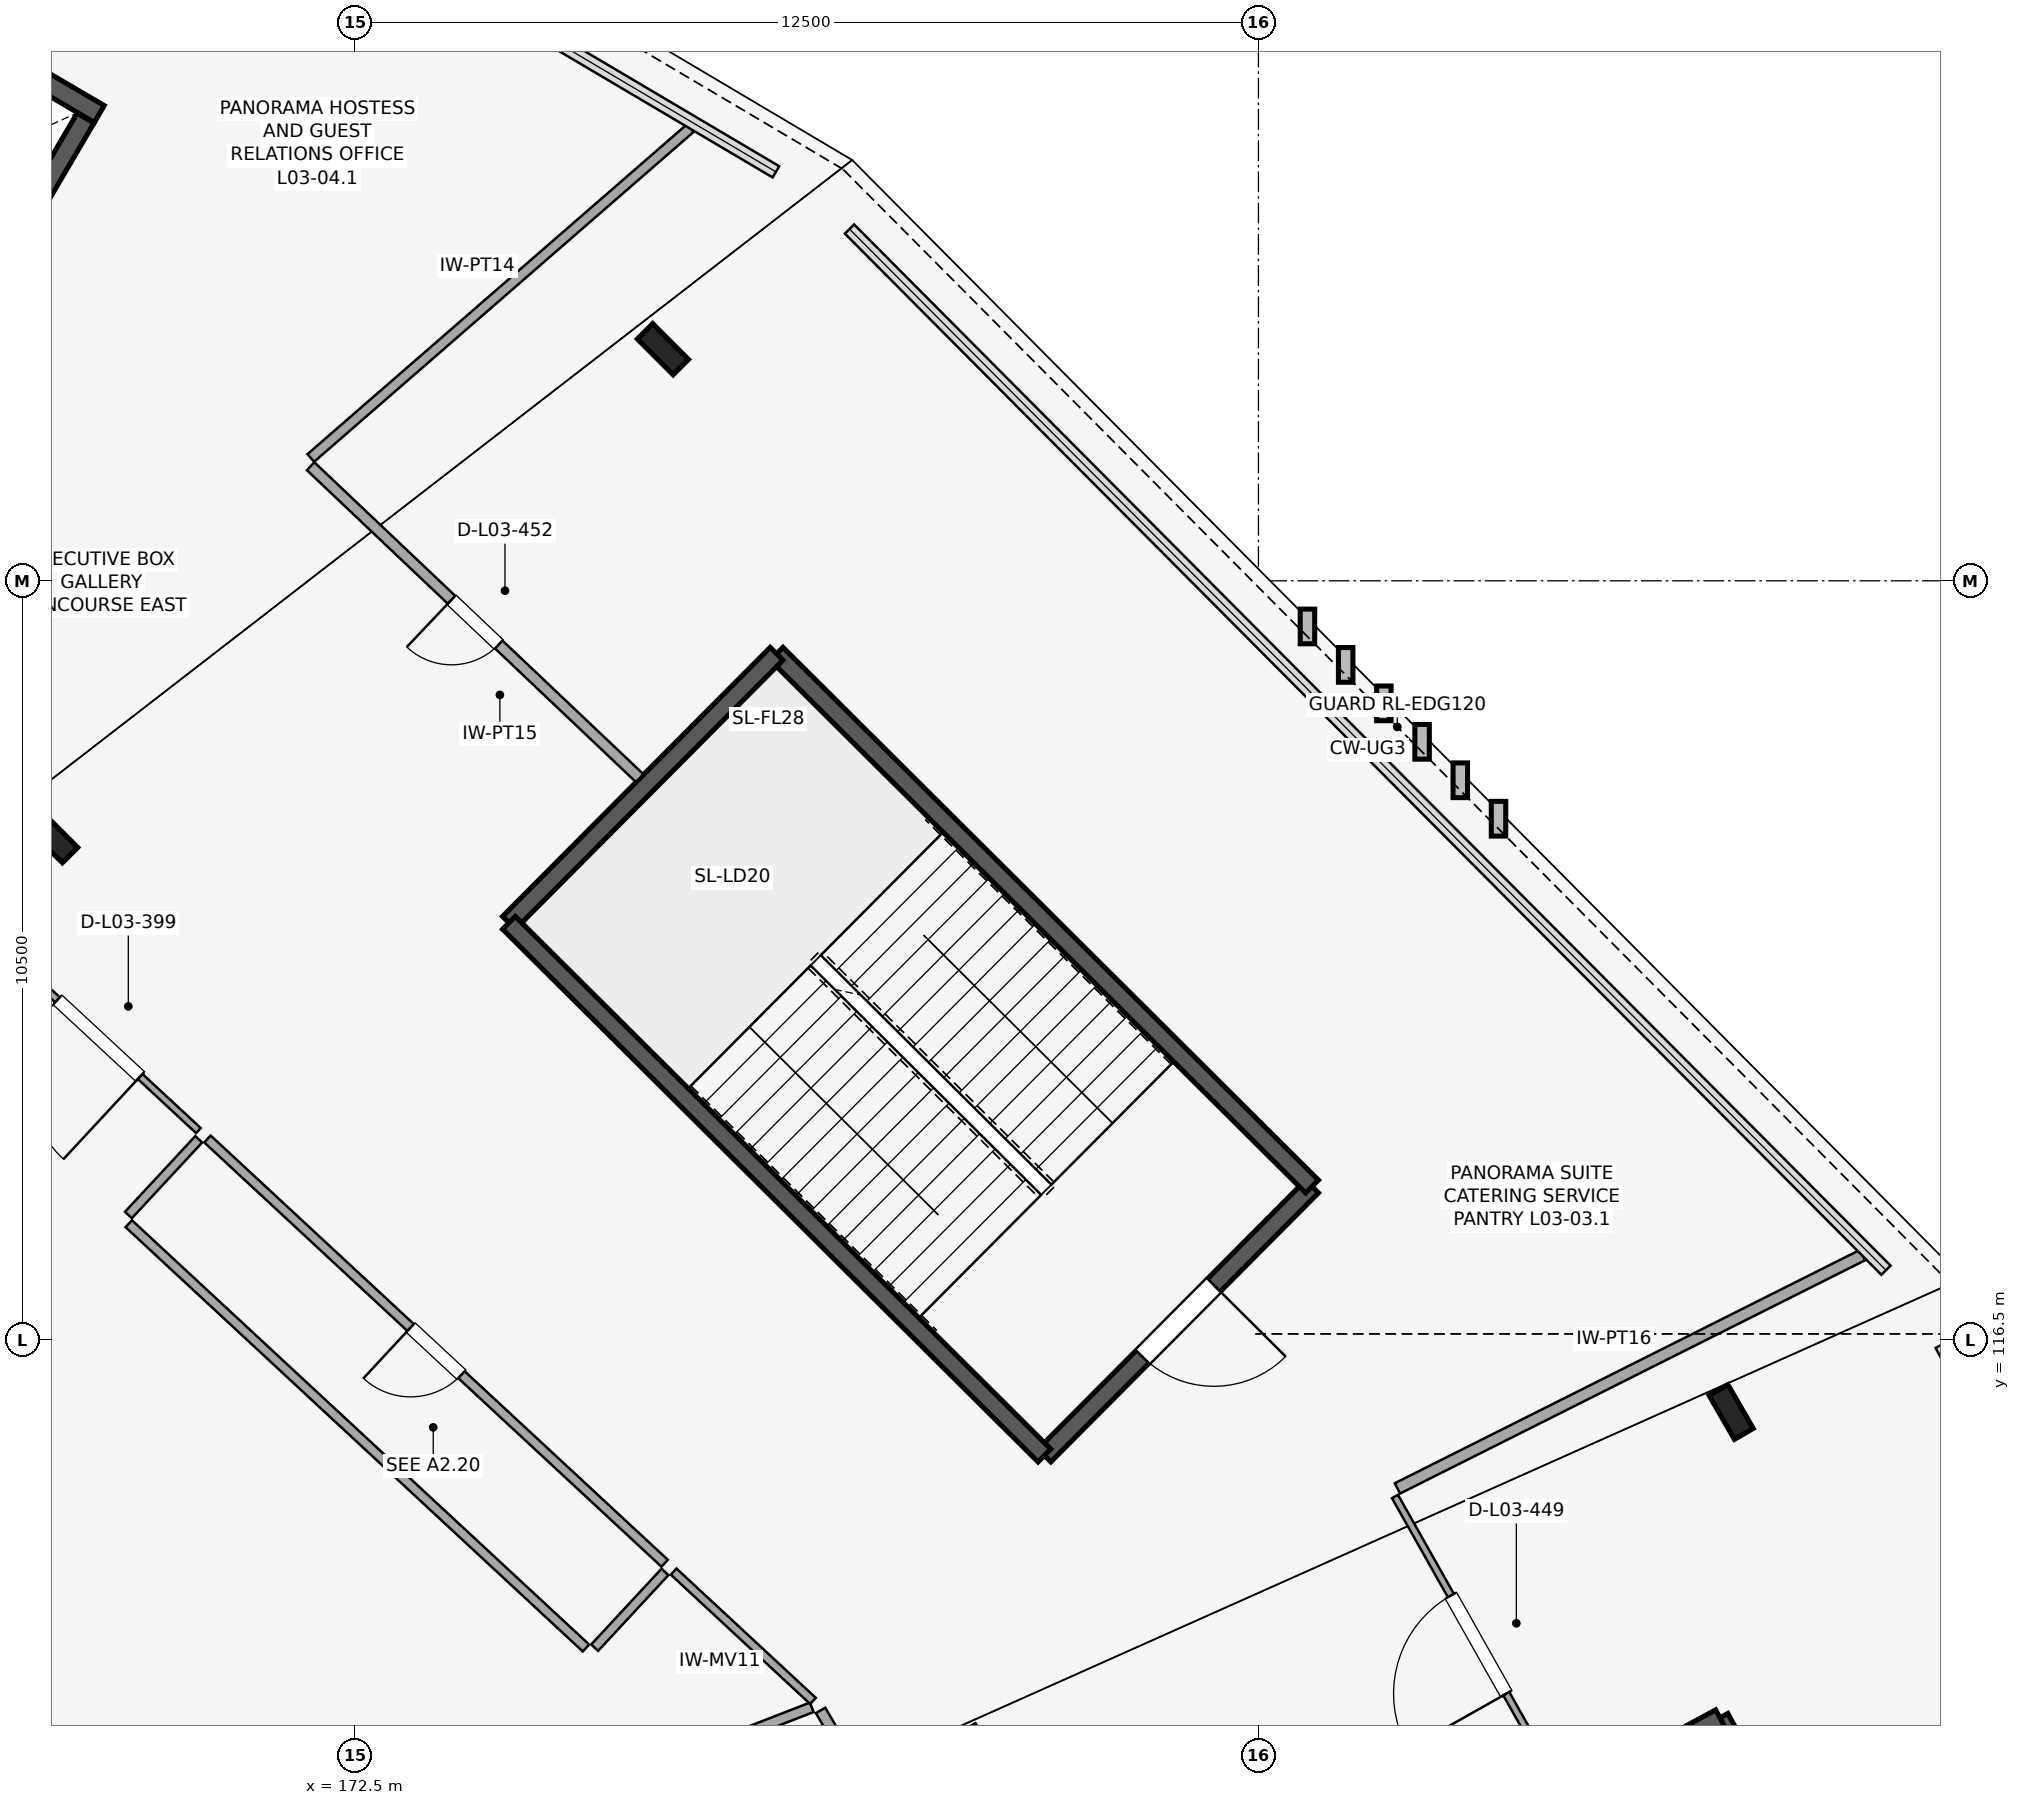
"""IFC4 building model, lengths in metres.
Left out: names, types, materials, properties, quantities, classifications, styles, units other than length and angle.
Written with IfcOpenShell. Run it as: python <this file> out.ifc"""

import sys

from ifc_helpers import new_model, si_unit, direction, frame, frame_2d, origin, origin_2d, place, context, subcontext, project, spatial, rectangle, i_section, extrude, element, fill, save


model = new_model("IFC4")
c1 = context("Model", 3, precision=1e-05, world=origin(), true_north=direction((0.0, 1.0)))
c2 = subcontext(c1, "Body", "Model", "MODEL_VIEW")
j1 = project(units=[si_unit("LENGTHUNIT", "METRE"), si_unit("PLANEANGLEUNIT", "RADIAN")], contexts=[c1])
p1 = place(None, origin())
s1 = spatial("IfcSite", under=j1, at=p1, CompositionType="ELEMENT")
p2 = place(p1, origin())
s2 = spatial("IfcBuilding", under=s1, at=p2, CompositionType="ELEMENT")
p3 = place(p2, frame((0.0, 0.0, 15.6)))
s3 = spatial("IfcBuildingStorey", under=s2, at=p3, CompositionType="ELEMENT", Elevation=15.6)
p4 = place(p3, frame((168.276, 123.487, 0.0), z_axis=(0.0, 0.0, 1.0), x_axis=(0.707106781187, 0.707106781187, 0.0)))
e1 = element("IfcColumn", 1, at=p4, inside=s3, PredefinedType="COLUMN", context=c2, shape_type="SweptSolid", body=[
    extrude(i_section(OverallWidth=0.3, OverallDepth=0.8, WebThickness=0.018, FlangeThickness=0.033, FilletRadius=0.03, at=origin_2d()), origin(), (0.0, 0.0, 1.0), 5.2),
])
for number, where, z_axis, x_axis in (
    (2, (191.54, 115.5, 0.0), (0.0, 0.0, 1.0), (0.866, 0.5, 0.0)),
    (3, (176.761, 130.205, 0.0), (0.0, 0.0, 1.0), (0.707, 0.707, 0.0)),
):
    element("IfcColumn", number, at=place(p3, frame(where, z_axis=z_axis, x_axis=x_axis)), inside=s3, PredefinedType="COLUMN", context=c2, shape_type="SweptSolid", body=[
        extrude(i_section(OverallWidth=0.3, OverallDepth=0.7, WebThickness=0.017, FlangeThickness=0.032, FilletRadius=0.027, at=origin_2d()), origin(), (0.0, 0.0, 1.0), 5.2),
    ])
p5 = place(p3, frame((182.039, 114.898, 0.0), z_axis=(0.0, 0.0, 1.0), x_axis=(0.705314141126, 0.708894888067, 0.0)))
e4 = element("IfcWall", 4, at=p5, inside=s3, PredefinedType="SHEAR", context=c2, shape_type="SweptSolid", body=[
    extrude(rectangle(XDim=5.25, YDim=0.25, at=frame_2d((2.625, 0.0))), origin(), (0.0, 0.0, 1.0), 4.9),
])
p6 = place(p5, frame((1.925, 0.0, 0.0)))
e5 = element("IfcOpeningElement", 5, at=p6, cuts=e4, PredefinedType="OPENING", context=c2, shape_type="SweptSolid", body=[
    extrude(rectangle(XDim=1.4, YDim=2.2, at=frame_2d((0.7, 1.1))), frame((0.0, 0.135, 0.0), z_axis=(0.0, -1.0, 0.0), x_axis=(1.0, 0.0, 0.0)), (0.0, 0.0, 1.0), 0.27),
])
p7 = place(p3, frame((185.742, 118.62, 0.0), z_axis=(0.0, 0.0, 1.0), x_axis=(-0.708891762409, 0.705317282639, 0.0)))
e6 = element("IfcWall", 6, at=p7, inside=s3, PredefinedType="SHEAR", context=c2, shape_type="SweptSolid", body=[
    extrude(rectangle(XDim=10.45, YDim=0.25, at=frame_2d((5.225, 0.0))), origin(), (0.0, 0.0, 1.0), 4.9),
])
p8 = place(p3, frame((178.334, 125.99, 0.0), z_axis=(0.0, 0.0, 1.0), x_axis=(-0.705314141126, -0.708894888067, 0.0)))
e7 = element("IfcWall", 7, at=p8, inside=s3, PredefinedType="SHEAR", context=c2, shape_type="SweptSolid", body=[
    extrude(rectangle(XDim=5.25, YDim=0.25, at=frame_2d((2.625, 0.0))), origin(), (0.0, 0.0, 1.0), 4.9),
])
p9 = place(p3, frame((174.631, 122.269, 0.0), z_axis=(0.0, 0.0, 1.0), x_axis=(0.708891762409, -0.705317282639, 0.0)))
e8 = element("IfcWall", 8, at=p9, inside=s3, PredefinedType="SHEAR", context=c2, shape_type="SweptSolid", body=[
    extrude(rectangle(XDim=10.45, YDim=0.25, at=frame_2d((5.225, 0.0))), origin(), (0.0, 0.0, 1.0), 4.9),
])
p10 = place(p3, frame((196.368, 102.083, 0.0), z_axis=(0.0, 0.0, 1.0), x_axis=(-0.476876856974, 0.878970115125, 0.0)))
e9 = element("IfcWall", 9, at=p10, inside=s3, PredefinedType="SHEAR", context=c2, shape_type="SweptSolid", body=[
    extrude(rectangle(XDim=10.45, YDim=0.25, at=frame_2d((5.225, 0.0))), origin(), (0.0, 0.0, 1.0), 4.9),
])
p11 = place(p3, frame((191.385, 111.269, 0.0), z_axis=(0.0, 0.0, 1.0), x_axis=(-0.878961487093, -0.47689275965, 0.0)))
e10 = element("IfcWall", 10, at=p11, inside=s3, PredefinedType="SHEAR", context=c2, shape_type="SweptSolid", body=[
    extrude(rectangle(XDim=5.25, YDim=0.25, at=frame_2d((2.625, 0.0))), origin(), (0.0, 0.0, 1.0), 4.9),
])
p12 = place(p3, frame((168.963, 133.459, 0.0), z_axis=(0.0, 0.0, 1.0), x_axis=(-0.862865684113, 0.505433290534, 0.0)))
e11 = element("IfcWall", 11, at=p12, inside=s3, PredefinedType="SHEAR", context=c2, shape_type="SweptSolid", body=[
    extrude(rectangle(XDim=7.4, YDim=0.27, at=frame_2d((3.7, 0.0))), origin(), (0.0, 0.0, 1.0), 4.9),
])
p13 = place(p3, frame((168.773, 133.402, 0.0), z_axis=(0.0, 0.0, 1.0), x_axis=(-0.505465660416, -0.862846722275, 0.0)))
e12 = element("IfcWall", 12, at=p13, inside=s3, PredefinedType="SHEAR", context=c2, shape_type="SweptSolid", body=[
    extrude(rectangle(XDim=2.74, YDim=0.27, at=frame_2d((1.37, 0.0))), origin(), (0.0, 0.0, 1.0), 4.9),
])
p14 = place(p3, frame((187.631, 96.478, 0.0), z_axis=(0.0, 0.0, 1.0), x_axis=(-0.50388511134, 0.863770684019, 0.0)))
e13 = element("IfcWall", 13, at=p14, inside=s3, PredefinedType="PARTITIONING", context=c2, shape_type="SweptSolid", body=[
    extrude(rectangle(XDim=17.242, YDim=0.15, at=frame_2d((8.621, 0.0))), origin(), (0.0, 0.0, 1.0), 2.45),
])
p15 = place(p14, frame((8.171, 0.0, 0.0)))
e14 = element("IfcOpeningElement", 14, at=p15, cuts=e13, PredefinedType="OPENING", context=c2, shape_type="SweptSolid", body=[
    extrude(rectangle(XDim=0.9, YDim=2.24, at=frame_2d((0.45, 1.12))), frame((0.0, 0.085, 0.0), z_axis=(0.0, -1.0, 0.0), x_axis=(1.0, 0.0, 0.0)), (0.0, 0.0, 1.0), 0.17),
])
p16 = place(p3, frame((168.927, 107.577, 0.0), z_axis=(0.0, 0.0, 1.0), x_axis=(0.932330284632, 0.361607854393, 0.0)))
e15 = element("IfcWall", 15, at=p16, inside=s3, PredefinedType="PARTITIONING", context=c2, shape_type="SweptSolid", body=[
    extrude(rectangle(XDim=10.611, YDim=0.14, at=frame_2d((5.306, 0.0))), origin(), (0.0, 0.0, 1.0), 2.45),
])
p17 = place(p3, frame((176.785, 113.407, 0.0), z_axis=(0.0, 0.0, 1.0), x_axis=(-0.73300806751, 0.680219944551, 0.0)))
e16 = element("IfcWall", 16, at=p17, inside=s3, PredefinedType="PARTITIONING", context=c2, shape_type="SweptSolid", body=[
    extrude(rectangle(XDim=8.63, YDim=0.13, at=frame_2d((4.315, 0.0))), origin(), (0.0, 0.0, 1.0), 2.45),
])
p18 = place(p17, frame((3.835, 0.0, 0.0)))
e17 = element("IfcOpeningElement", 17, at=p18, cuts=e16, PredefinedType="OPENING", context=c2, shape_type="SweptSolid", body=[
    extrude(rectangle(XDim=0.96, YDim=2.24, at=frame_2d((0.48, 1.12))), frame((0.0, 0.075, 0.0), z_axis=(0.0, -1.0, 0.0), x_axis=(1.0, 0.0, 0.0)), (0.0, 0.0, 1.0), 0.15),
])
p19 = place(p3, frame((175.696, 112.235, 0.0), z_axis=(0.0, 0.0, 1.0), x_axis=(-0.732994977595, 0.68023405003, 0.0)))
e18 = element("IfcWall", 18, at=p19, inside=s3, PredefinedType="PARTITIONING", context=c2, shape_type="SweptSolid", body=[
    extrude(rectangle(XDim=8.63, YDim=0.13, at=frame_2d((4.315, 0.0))), origin(), (0.0, 0.0, 1.0), 2.45),
])
for number, where, z_axis, x_axis in (
    (19, (176.789, 113.287, 0.0), (0.0, 0.0, 1.0), (-0.68, -0.733, 0.0)),
    (20, (170.339, 119.273, 0.0), (0.0, 0.0, 1.0), (-0.68, -0.733, 0.0)),
):
    element("IfcWall", number, at=place(p3, frame(where, z_axis=z_axis, x_axis=x_axis)), inside=s3, PredefinedType="PARTITIONING", context=c2, shape_type="SweptSolid", body=[
        extrude(rectangle(XDim=1.43, YDim=0.13, at=frame_2d((0.715, 0.0))), origin(), (0.0, 0.0, 1.0), 2.45),
    ])
p20 = place(p3, frame((178.837, 111.503, 0.0), z_axis=(0.0, 0.0, 1.0), x_axis=(-0.732978614057, 0.680251682347, 0.0)))
e21 = element("IfcWall", 21, at=p20, inside=s3, PredefinedType="MOVABLE", context=c2, shape_type="SweptSolid", body=[
    extrude(rectangle(XDim=2.63, YDim=0.115, at=frame_2d((1.315, 0.0))), origin(), (0.0, 0.0, 1.0), 2.45),
])
p21 = place(p3, frame((170.334, 119.393, 0.0), z_axis=(0.0, 0.0, 1.0), x_axis=(-0.732995223413, 0.680233785146, 0.0)))
e22 = element("IfcWall", 22, at=p21, inside=s3, PredefinedType="MOVABLE", context=c2, shape_type="SweptSolid", body=[
    extrude(rectangle(XDim=6.594, YDim=0.095, at=frame_2d((3.297, 0.0))), origin(), (0.0, 0.0, 1.0), 2.45),
])
p22 = place(p21, frame((1.1, 0.0, 0.0)))
e23 = element("IfcOpeningElement", 23, at=p22, cuts=e22, PredefinedType="OPENING", context=c2, shape_type="SweptSolid", body=[
    extrude(rectangle(XDim=1.56, YDim=2.1, at=frame_2d((0.78, 1.05))), frame((0.0, 0.057, 0.0), z_axis=(0.0, -1.0, 0.0), x_axis=(1.0, 0.0, 0.0)), (0.0, 0.0, 1.0), 0.115),
])
p23 = place(p3, frame((189.202, 110.232, 0.0), z_axis=(0.0, 0.0, 1.0), x_axis=(-0.491534087668, 0.870858335586, 0.0)))
e24 = element("IfcWall", 24, at=p23, inside=s3, PredefinedType="MOVABLE", context=c2, shape_type="SweptSolid", body=[
    extrude(rectangle(XDim=4.706, YDim=0.095, at=frame_2d((2.353, 0.0))), origin(), (0.0, 0.0, 1.0), 2.45),
])
p24 = place(p23, frame((1.573, 0.0, 0.0)))
e25 = element("IfcOpeningElement", 25, at=p24, cuts=e24, PredefinedType="OPENING", context=c2, shape_type="SweptSolid", body=[
    extrude(rectangle(XDim=1.56, YDim=2.1, at=frame_2d((0.78, 1.05))), frame((0.0, 0.057, 0.0), z_axis=(0.0, -1.0, 0.0), x_axis=(1.0, 0.0, 0.0)), (0.0, 0.0, 1.0), 0.115),
])
p25 = place(p3, frame((186.923, 114.443, 0.0), z_axis=(0.0, 0.0, 1.0), x_axis=(0.893822831602, 0.448420277984, 0.0)))
e26 = element("IfcWall", 26, at=p25, inside=s3, PredefinedType="PARTITIONING", context=c2, shape_type="SweptSolid", body=[
    extrude(rectangle(XDim=7.2, YDim=0.16, at=frame_2d((3.6, 0.0))), origin(), (0.0, 0.0, 1.0), 2.45),
])
p26 = place(p3, frame((176.439, 124.27, 0.0), z_axis=(0.0, 0.0, 1.0), x_axis=(-0.72578901813, 0.687917365068, 0.0)))
e27 = element("IfcWall", 27, at=p26, inside=s3, PredefinedType="PARTITIONING", context=c2, shape_type="SweptSolid", body=[
    extrude(rectangle(XDim=6.272, YDim=0.15, at=frame_2d((3.136, 0.0))), origin(), (0.0, 0.0, 1.0), 2.45),
])
p27 = place(p26, frame((2.686, 0.0, 0.0)))
e28 = element("IfcOpeningElement", 28, at=p27, cuts=e27, PredefinedType="OPENING", context=c2, shape_type="SweptSolid", body=[
    extrude(rectangle(XDim=0.9, YDim=2.24, at=frame_2d((0.45, 1.12))), frame((0.0, 0.085, 0.0), z_axis=(0.0, -1.0, 0.0), x_axis=(1.0, 0.0, 0.0)), (0.0, 0.0, 1.0), 0.17),
])
p28 = place(p3, frame((171.889, 128.699, 0.0), z_axis=(0.0, 0.0, 1.0), x_axis=(0.754730895787, 0.656034507434, 0.0)))
e29 = element("IfcWall", 29, at=p28, inside=s3, PredefinedType="PARTITIONING", context=c2, shape_type="SweptSolid", body=[
    extrude(rectangle(XDim=6.958, YDim=0.14, at=frame_2d((3.479, 0.0))), origin(), (0.0, 0.0, 1.0), 2.45),
])
p29 = place(p6, frame((1.4, 0.0, 0.0), z_axis=(0.0, 0.0, 1.0), x_axis=(-1.0, 0.0, 0.0)))
e30 = element("IfcDoor", 30, at=p29, inside=s3, OperationType="SINGLE_SWING_LEFT", PredefinedType="DOOR", context=c2, shape_type="SweptSolid", body=[
    extrude(rectangle(XDim=1.4, YDim=2.2, at=frame_2d((0.7, 1.1))), frame((0.0, 0.025, 0.0), z_axis=(0.0, -1.0, 0.0), x_axis=(1.0, 0.0, 0.0)), (0.0, 0.0, 1.0), 0.05),
])
fill(e5, e30)
p30 = place(p18, origin())
e31 = element("IfcDoor", 31, at=p30, inside=s3, OperationType="SINGLE_SWING_RIGHT", PredefinedType="DOOR", context=c2, shape_type="SweptSolid", body=[
    extrude(rectangle(XDim=0.96, YDim=2.24, at=frame_2d((0.48, 1.12))), frame((0.0, 0.025, 0.0), z_axis=(0.0, -1.0, 0.0), x_axis=(1.0, 0.0, 0.0)), (0.0, 0.0, 1.0), 0.05),
])
fill(e17, e31)
p31 = place(p22, origin())
e32 = element("IfcDoor", 32, at=p31, inside=s3, OperationType="SINGLE_SWING_LEFT", PredefinedType="DOOR", context=c2, shape_type="SweptSolid", body=[
    extrude(rectangle(XDim=1.56, YDim=2.1, at=frame_2d((0.78, 1.05))), frame((0.0, 0.025, 0.0), z_axis=(0.0, -1.0, 0.0), x_axis=(1.0, 0.0, 0.0)), (0.0, 0.0, 1.0), 0.05),
])
fill(e23, e32)
p32 = place(p24, origin())
e33 = element("IfcDoor", 33, at=p32, inside=s3, OperationType="SINGLE_SWING_LEFT", PredefinedType="DOOR", context=c2, shape_type="SweptSolid", body=[
    extrude(rectangle(XDim=1.56, YDim=2.1, at=frame_2d((0.78, 1.05))), frame((0.0, 0.025, 0.0), z_axis=(0.0, -1.0, 0.0), x_axis=(1.0, 0.0, 0.0)), (0.0, 0.0, 1.0), 0.05),
])
fill(e25, e33)
p33 = place(p27, origin())
e34 = element("IfcDoor", 34, at=p33, inside=s3, OperationType="SINGLE_SWING_RIGHT", PredefinedType="DOOR", context=c2, shape_type="SweptSolid", body=[
    extrude(rectangle(XDim=0.9, YDim=2.24, at=frame_2d((0.45, 1.12))), frame((0.0, 0.025, 0.0), z_axis=(0.0, -1.0, 0.0), x_axis=(1.0, 0.0, 0.0)), (0.0, 0.0, 1.0), 0.05),
])
fill(e28, e34)
save(model, sys.argv[1])
